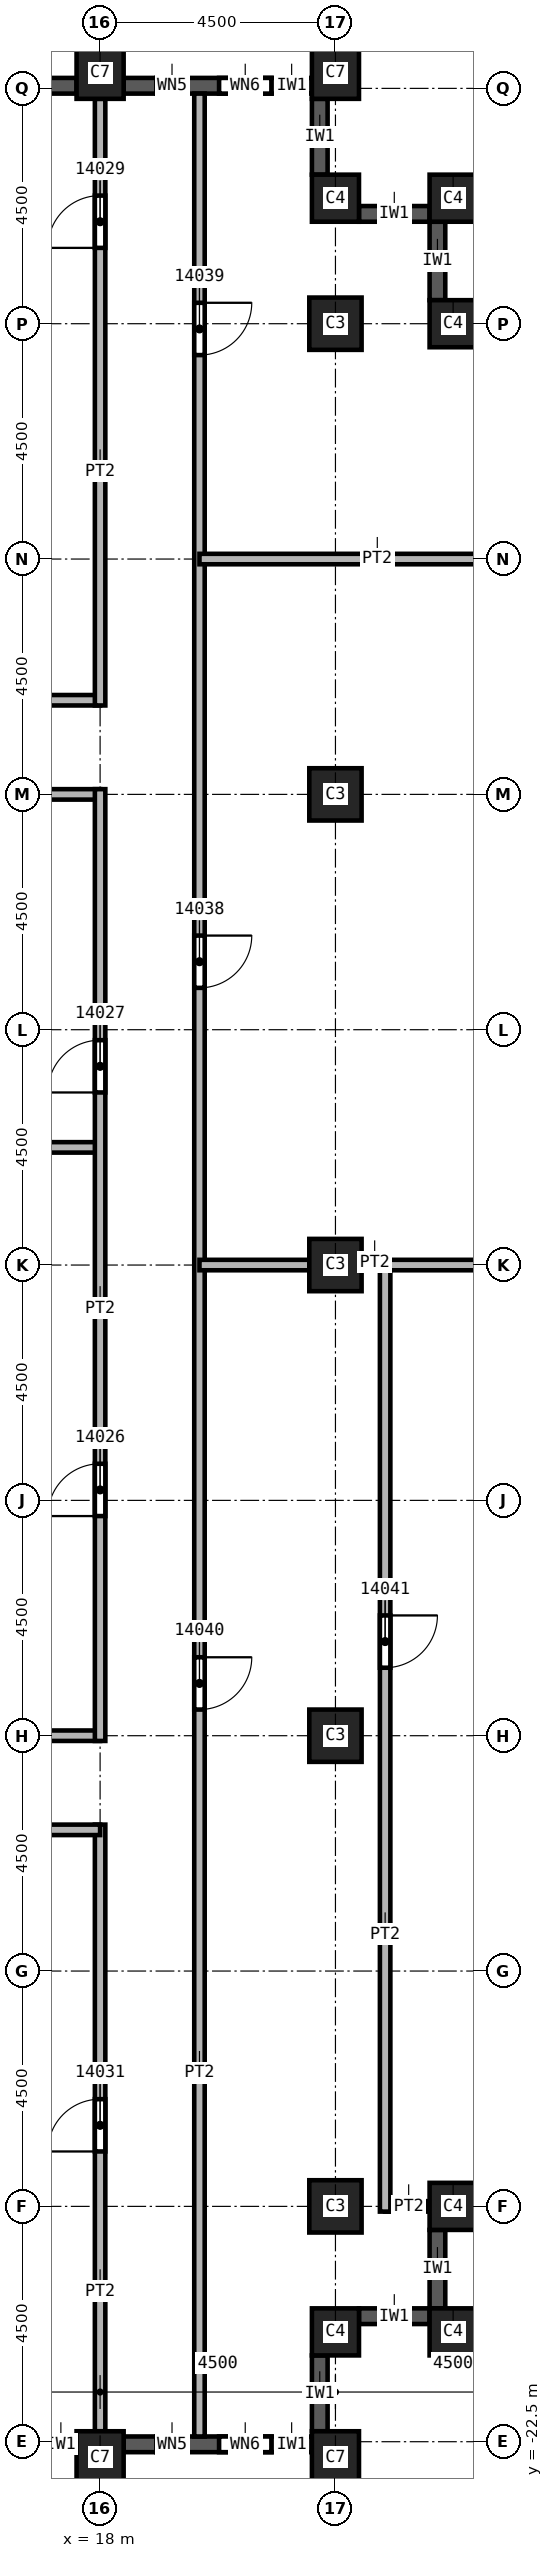
"""IFC4 building model, lengths in metres.
Left out: names, types, materials, properties, quantities, classifications, styles, units other than length and angle.
Written with IfcOpenShell. Run it as: python <this file> out.ifc"""

import sys

from ifc_helpers import new_model, si_unit, direction, frame, frame_2d, origin, origin_2d, place, context, subcontext, project, spatial, rectangle, extrude, element, fill, save


model = new_model("IFC4")
c1 = context("Model", 3, precision=1e-05, world=origin(), true_north=direction((0.0, 1.0)))
c2 = subcontext(c1, "Body", "Model", "MODEL_VIEW")
j1 = project(units=[si_unit("LENGTHUNIT", "METRE"), si_unit("PLANEANGLEUNIT", "RADIAN")], contexts=[c1])
p1 = place(None, origin())
s1 = spatial("IfcSite", under=j1, at=p1, CompositionType="ELEMENT")
p2 = place(p1, origin())
s2 = spatial("IfcBuilding", under=s1, at=p2, CompositionType="ELEMENT")
p3 = place(p2, frame((0.0, 0.0, 224.0)))
s3 = spatial("IfcBuildingStorey", under=s2, at=p3, CompositionType="ELEMENT", Elevation=224.0)
for number, where, z_axis, x_axis in (
    (1, (22.5, 0.0, 0.0), (0.0, 0.0, 1.0), (1.0, 0.0, 0.0)),
    (2, (22.5, 9.0, 0.0), (0.0, 0.0, 1.0), (1.0, 0.0, 0.0)),
    (3, (22.5, 18.0, 0.0), (0.0, 0.0, 1.0), (1.0, 0.0, 0.0)),
    (4, (22.5, -9.0, 0.0), (0.0, 0.0, 1.0), (1.0, 0.0, 0.0)),
    (5, (22.5, -18.0, 0.0), (0.0, 0.0, 1.0), (1.0, 0.0, 0.0)),
):
    element("IfcColumn", number, at=place(p3, frame(where, z_axis=z_axis, x_axis=x_axis)), inside=s3, PredefinedType="COLUMN", context=c2, shape_type="SweptSolid", body=[
        extrude(rectangle(XDim=1.0, YDim=1.0, at=origin_2d()), origin(), (0.0, 0.0, 1.0), 3.72),
    ])
for number, where, z_axis, x_axis in (
    (6, (18.0, 22.8, 0.0), (0.0, 0.0, 1.0), (1.0, 0.0, 0.0)),
    (7, (22.5, 22.8, 0.0), (0.0, 0.0, 1.0), (1.0, 0.0, 0.0)),
    (8, (18.0, -22.8, 0.0), (0.0, 0.0, 1.0), (1.0, 0.0, 0.0)),
    (9, (22.5, -22.8, 0.0), (0.0, 0.0, 1.0), (1.0, 0.0, 0.0)),
):
    element("IfcColumn", number, at=place(p3, frame(where, z_axis=z_axis, x_axis=x_axis)), inside=s3, PredefinedType="COLUMN", context=c2, shape_type="SweptSolid", body=[
        extrude(rectangle(XDim=0.9, YDim=1.0, at=origin_2d()), origin(), (0.0, 0.0, 1.0), 3.72),
    ])
for number, where, z_axis, x_axis in (
    (10, (22.5, 20.4, 0.0), (0.0, 0.0, 1.0), (1.0, 0.0, 0.0)),
    (11, (24.75, 20.4, 0.0), (0.0, 0.0, 1.0), (1.0, 0.0, 0.0)),
    (12, (24.75, 18.0, 0.0), (0.0, 0.0, 1.0), (1.0, 0.0, 0.0)),
    (13, (22.5, -20.4, 0.0), (0.0, 0.0, 1.0), (1.0, 0.0, 0.0)),
    (14, (24.75, -20.4, 0.0), (0.0, 0.0, 1.0), (1.0, 0.0, 0.0)),
    (15, (24.75, -18.0, 0.0), (0.0, 0.0, 1.0), (1.0, 0.0, 0.0)),
):
    element("IfcColumn", number, at=place(p3, frame(where, z_axis=z_axis, x_axis=x_axis)), inside=s3, PredefinedType="COLUMN", context=c2, shape_type="SweptSolid", body=[
        extrude(rectangle(XDim=0.9, YDim=0.9, at=origin_2d()), origin(), (0.0, 0.0, 1.0), 3.72),
    ])
p4 = place(p3, frame((13.95, -22.55, 0.0), z_axis=(0.0, 0.0, 1.0), x_axis=(1.0, 0.0, 0.0)))
e16 = element("IfcWall", 16, at=p4, inside=s3, PredefinedType="SOLIDWALL", context=c2, shape_type="SweptSolid", body=[
    extrude(rectangle(XDim=3.6, YDim=0.3, at=frame_2d((1.8, 0.0))), origin(), (0.0, 0.0, 1.0), 3.12),
])
p5 = place(p4, frame((0.6, 0.0, 0.8)))
e17 = element("IfcOpeningElement", 17, at=p5, cuts=e16, PredefinedType="OPENING", context=c2, shape_type="SweptSolid", body=[
    extrude(rectangle(XDim=2.4, YDim=1.95, at=frame_2d((1.2, 0.975))), frame((0.0, 0.15, 0.0), z_axis=(0.0, -1.0, 0.0), x_axis=(1.0, 0.0, 0.0)), (0.0, 0.0, 1.0), 0.3),
])
p6 = place(p3, frame((18.45, -22.55, 0.0), z_axis=(0.0, 0.0, 1.0), x_axis=(1.0, 0.0, 0.0)))
e18 = element("IfcWall", 18, at=p6, inside=s3, PredefinedType="SOLIDWALL", context=c2, shape_type="SweptSolid", body=[
    extrude(rectangle(XDim=3.6, YDim=0.3, at=frame_2d((1.8, 0.0))), origin(), (0.0, 0.0, 1.0), 3.12),
])
p7 = place(p6, frame((0.625, 0.0, 0.8)))
e19 = element("IfcOpeningElement", 19, at=p7, cuts=e18, PredefinedType="OPENING", context=c2, shape_type="SweptSolid", body=[
    extrude(rectangle(XDim=0.6, YDim=1.95, at=frame_2d((0.3, 0.975))), frame((0.0, 0.15, 0.0), z_axis=(0.0, -1.0, 0.0), x_axis=(1.0, 0.0, 0.0)), (0.0, 0.0, 1.0), 0.3),
])
p8 = place(p6, frame((1.825, 0.0, 0.8)))
e20 = element("IfcOpeningElement", 20, at=p8, cuts=e18, PredefinedType="OPENING", context=c2, shape_type="SweptSolid", body=[
    extrude(rectangle(XDim=1.0, YDim=1.95, at=frame_2d((0.5, 0.975))), frame((0.0, 0.15, 0.0), z_axis=(0.0, -1.0, 0.0), x_axis=(1.0, 0.0, 0.0)), (0.0, 0.0, 1.0), 0.3),
])
p9 = place(p3, frame((22.2, -22.3, 0.0), z_axis=(0.0, 0.0, 1.0), x_axis=(0.0, 1.0, 0.0)))
e21 = element("IfcWall", 21, at=p9, inside=s3, PredefinedType="SOLIDWALL", context=c2, shape_type="SweptSolid", body=[
    extrude(rectangle(XDim=1.45, YDim=0.3, at=frame_2d((0.725, 0.0))), origin(), (0.0, 0.0, 1.0), 3.12),
])
p10 = place(p3, frame((22.95, -20.1, 0.0), z_axis=(0.0, 0.0, 1.0), x_axis=(1.0, 0.0, 0.0)))
e22 = element("IfcWall", 22, at=p10, inside=s3, PredefinedType="SOLIDWALL", context=c2, shape_type="SweptSolid", body=[
    extrude(rectangle(XDim=1.35, YDim=0.3, at=frame_2d((0.675, 0.0))), origin(), (0.0, 0.0, 1.0), 3.12),
])
for number, where, z_axis, x_axis in (
    (23, (24.45, -19.95, 0.0), (0.0, 0.0, 1.0), (0.0, 1.0, 0.0)),
    (24, (24.45, 18.45, 0.0), (0.0, 0.0, 1.0), (0.0, 1.0, 0.0)),
):
    element("IfcWall", number, at=place(p3, frame(where, z_axis=z_axis, x_axis=x_axis)), inside=s3, PredefinedType="SOLIDWALL", context=c2, shape_type="SweptSolid", body=[
        extrude(rectangle(XDim=1.5, YDim=0.3, at=frame_2d((0.75, 0.0))), origin(), (0.0, 0.0, 1.0), 3.12),
    ])
p11 = place(p3, frame((24.3, 20.1, 0.0), z_axis=(0.0, 0.0, 1.0), x_axis=(-1.0, 0.0, 0.0)))
e25 = element("IfcWall", 25, at=p11, inside=s3, PredefinedType="SOLIDWALL", context=c2, shape_type="SweptSolid", body=[
    extrude(rectangle(XDim=1.35, YDim=0.3, at=frame_2d((0.675, 0.0))), origin(), (0.0, 0.0, 1.0), 3.12),
])
p12 = place(p3, frame((22.2, 20.85, 0.0), z_axis=(0.0, 0.0, 1.0), x_axis=(0.0, 1.0, 0.0)))
e26 = element("IfcWall", 26, at=p12, inside=s3, PredefinedType="SOLIDWALL", context=c2, shape_type="SweptSolid", body=[
    extrude(rectangle(XDim=1.45, YDim=0.3, at=frame_2d((0.725, 0.0))), origin(), (0.0, 0.0, 1.0), 3.12),
])
p13 = place(p3, frame((22.05, 22.55, 0.0), z_axis=(0.0, 0.0, 1.0), x_axis=(-1.0, 0.0, 0.0)))
e27 = element("IfcWall", 27, at=p13, inside=s3, PredefinedType="SOLIDWALL", context=c2, shape_type="SweptSolid", body=[
    extrude(rectangle(XDim=3.6, YDim=0.3, at=frame_2d((1.8, 0.0))), origin(), (0.0, 0.0, 1.0), 3.12),
])
p14 = place(p13, frame((0.775, 0.0, 0.8)))
e28 = element("IfcOpeningElement", 28, at=p14, cuts=e27, PredefinedType="OPENING", context=c2, shape_type="SweptSolid", body=[
    extrude(rectangle(XDim=1.0, YDim=1.95, at=frame_2d((0.5, 0.975))), frame((0.0, 0.15, 0.0), z_axis=(0.0, -1.0, 0.0), x_axis=(1.0, 0.0, 0.0)), (0.0, 0.0, 1.0), 0.3),
])
p15 = place(p13, frame((2.375, 0.0, 0.8)))
e29 = element("IfcOpeningElement", 29, at=p15, cuts=e27, PredefinedType="OPENING", context=c2, shape_type="SweptSolid", body=[
    extrude(rectangle(XDim=0.6, YDim=1.95, at=frame_2d((0.3, 0.975))), frame((0.0, 0.15, 0.0), z_axis=(0.0, -1.0, 0.0), x_axis=(1.0, 0.0, 0.0)), (0.0, 0.0, 1.0), 0.3),
])
p16 = place(p3, frame((17.55, 22.55, 0.0), z_axis=(0.0, 0.0, 1.0), x_axis=(-1.0, 0.0, 0.0)))
e30 = element("IfcWall", 30, at=p16, inside=s3, PredefinedType="SOLIDWALL", context=c2, shape_type="SweptSolid", body=[
    extrude(rectangle(XDim=3.6, YDim=0.3, at=frame_2d((1.8, 0.0))), origin(), (0.0, 0.0, 1.0), 3.12),
])
p17 = place(p16, frame((0.6, 0.0, 0.8)))
e31 = element("IfcOpeningElement", 31, at=p17, cuts=e30, PredefinedType="OPENING", context=c2, shape_type="SweptSolid", body=[
    extrude(rectangle(XDim=2.4, YDim=1.95, at=frame_2d((1.2, 0.975))), frame((0.0, 0.15, 0.0), z_axis=(0.0, -1.0, 0.0), x_axis=(1.0, 0.0, 0.0)), (0.0, 0.0, 1.0), 0.3),
])
for number, where, z_axis, x_axis in (
    (32, (13.5, -9.0, 0.0), (0.0, 0.0, 1.0), (1.0, 0.0, 0.0)),
    (33, (13.5, 2.25, 0.0), (0.0, 0.0, 1.0), (1.0, 0.0, 0.0)),
    (34, (18.0, 9.0, 0.0), (0.0, 0.0, 1.0), (-1.0, 0.0, 0.0)),
):
    element("IfcWall", number, at=place(p3, frame(where, z_axis=z_axis, x_axis=x_axis)), inside=s3, PredefinedType="PARTITIONING", context=c2, shape_type="SweptSolid", body=[
        extrude(rectangle(XDim=4.5, YDim=0.2, at=frame_2d((2.25, 0.0))), origin(), (0.0, 0.0, 1.0), 3.72),
    ])
p18 = place(p3, frame((14.4, 10.8, 0.0), z_axis=(0.0, 0.0, 1.0), x_axis=(1.0, 0.0, 0.0)))
e35 = element("IfcWall", 35, at=p18, inside=s3, PredefinedType="PARTITIONING", context=c2, shape_type="SweptSolid", body=[
    extrude(rectangle(XDim=3.6, YDim=0.2, at=frame_2d((1.8, 0.0))), origin(), (0.0, 0.0, 1.0), 3.72),
])
p19 = place(p3, frame((18.0, -22.3, 0.0), z_axis=(0.0, 0.0, 1.0), x_axis=(0.0, 1.0, 0.0)))
e36 = element("IfcWall", 36, at=p19, inside=s3, PredefinedType="PARTITIONING", context=c2, shape_type="SweptSolid", body=[
    extrude(rectangle(XDim=11.6, YDim=0.2, at=frame_2d((5.8, 0.0))), origin(), (0.0, 0.0, 1.0), 3.72),
])
p20 = place(p19, frame((5.35, 0.0, 0.0)))
e37 = element("IfcOpeningElement", 37, at=p20, cuts=e36, PredefinedType="OPENING", context=c2, shape_type="SweptSolid", body=[
    extrude(rectangle(XDim=1.0, YDim=2.1, at=frame_2d((0.5, 1.05))), frame((0.0, 0.1, 0.0), z_axis=(0.0, -1.0, 0.0), x_axis=(1.0, 0.0, 0.0)), (0.0, 0.0, 1.0), 0.2),
])
p21 = place(p3, frame((18.0, -10.8, 0.0), z_axis=(0.0, 0.0, 1.0), x_axis=(-1.0, 0.0, 0.0)))
e38 = element("IfcWall", 38, at=p21, inside=s3, PredefinedType="PARTITIONING", context=c2, shape_type="SweptSolid", body=[
    extrude(rectangle(XDim=3.6, YDim=0.2, at=frame_2d((1.8, 0.0))), origin(), (0.0, 0.0, 1.0), 3.72),
])
p22 = place(p3, frame((18.0, -9.1, 0.0), z_axis=(0.0, 0.0, 1.0), x_axis=(0.0, 1.0, 0.0)))
e39 = element("IfcWall", 39, at=p22, inside=s3, PredefinedType="PARTITIONING", context=c2, shape_type="SweptSolid", body=[
    extrude(rectangle(XDim=18.2, YDim=0.2, at=frame_2d((9.1, 0.0))), origin(), (0.0, 0.0, 1.0), 3.72),
])
p23 = place(p22, frame((4.3, 0.0, 0.0)))
e40 = element("IfcOpeningElement", 40, at=p23, cuts=e39, PredefinedType="OPENING", context=c2, shape_type="SweptSolid", body=[
    extrude(rectangle(XDim=1.0, YDim=2.1, at=frame_2d((0.5, 1.05))), frame((0.0, 0.1, 0.0), z_axis=(0.0, -1.0, 0.0), x_axis=(1.0, 0.0, 0.0)), (0.0, 0.0, 1.0), 0.2),
])
p24 = place(p22, frame((12.4, 0.0, 0.0)))
e41 = element("IfcOpeningElement", 41, at=p24, cuts=e39, PredefinedType="OPENING", context=c2, shape_type="SweptSolid", body=[
    extrude(rectangle(XDim=1.0, YDim=2.1, at=frame_2d((0.5, 1.05))), frame((0.0, 0.1, 0.0), z_axis=(0.0, -1.0, 0.0), x_axis=(1.0, 0.0, 0.0)), (0.0, 0.0, 1.0), 0.2),
])
p25 = place(p3, frame((18.0, 10.7, 0.0), z_axis=(0.0, 0.0, 1.0), x_axis=(0.0, 1.0, 0.0)))
e42 = element("IfcWall", 42, at=p25, inside=s3, PredefinedType="PARTITIONING", context=c2, shape_type="SweptSolid", body=[
    extrude(rectangle(XDim=11.6, YDim=0.2, at=frame_2d((5.8, 0.0))), origin(), (0.0, 0.0, 1.0), 3.72),
])
p26 = place(p25, frame((8.75, 0.0, 0.0)))
e43 = element("IfcOpeningElement", 43, at=p26, cuts=e42, PredefinedType="OPENING", context=c2, shape_type="SweptSolid", body=[
    extrude(rectangle(XDim=1.0, YDim=2.1, at=frame_2d((0.5, 1.05))), frame((0.0, 0.1, 0.0), z_axis=(0.0, -1.0, 0.0), x_axis=(1.0, 0.0, 0.0)), (0.0, 0.0, 1.0), 0.2),
])
p27 = place(p3, frame((19.9, 22.4, 0.0), z_axis=(0.0, 0.0, 1.0), x_axis=(0.0, -1.0, 0.0)))
e44 = element("IfcWall", 44, at=p27, inside=s3, PredefinedType="PARTITIONING", context=c2, shape_type="SweptSolid", body=[
    extrude(rectangle(XDim=44.8, YDim=0.2, at=frame_2d((22.4, 0.0))), origin(), (0.0, 0.0, 1.0), 3.72),
])
p28 = place(p27, frame((16.1, 0.0, 0.0)))
e45 = element("IfcOpeningElement", 45, at=p28, cuts=e44, PredefinedType="OPENING", context=c2, shape_type="SweptSolid", body=[
    extrude(rectangle(XDim=1.0, YDim=2.1, at=frame_2d((0.5, 1.05))), frame((0.0, 0.1, 0.0), z_axis=(0.0, -1.0, 0.0), x_axis=(1.0, 0.0, 0.0)), (0.0, 0.0, 1.0), 0.2),
])
p29 = place(p27, frame((4.0, 0.0, 0.0)))
e46 = element("IfcOpeningElement", 46, at=p29, cuts=e44, PredefinedType="OPENING", context=c2, shape_type="SweptSolid", body=[
    extrude(rectangle(XDim=1.0, YDim=2.1, at=frame_2d((0.5, 1.05))), frame((0.0, 0.1, 0.0), z_axis=(0.0, -1.0, 0.0), x_axis=(1.0, 0.0, 0.0)), (0.0, 0.0, 1.0), 0.2),
])
p30 = place(p27, frame((29.9, 0.0, 0.0)))
e47 = element("IfcOpeningElement", 47, at=p30, cuts=e44, PredefinedType="OPENING", context=c2, shape_type="SweptSolid", body=[
    extrude(rectangle(XDim=1.0, YDim=2.1, at=frame_2d((0.5, 1.05))), frame((0.0, 0.1, 0.0), z_axis=(0.0, -1.0, 0.0), x_axis=(1.0, 0.0, 0.0)), (0.0, 0.0, 1.0), 0.2),
])
p31 = place(p3, frame((19.9, 13.5, 0.0), z_axis=(0.0, 0.0, 1.0), x_axis=(1.0, 0.0, 0.0)))
e48 = element("IfcWall", 48, at=p31, inside=s3, PredefinedType="PARTITIONING", context=c2, shape_type="SweptSolid", body=[
    extrude(rectangle(XDim=6.7, YDim=0.2, at=frame_2d((3.35, 0.0))), origin(), (0.0, 0.0, 1.0), 3.72),
])
p32 = place(p3, frame((23.45, -18.0, 0.0), z_axis=(0.0, 0.0, 1.0), x_axis=(1.0, 0.0, 0.0)))
e49 = element("IfcWall", 49, at=p32, inside=s3, PredefinedType="PARTITIONING", context=c2, shape_type="SweptSolid", body=[
    extrude(rectangle(XDim=0.8, YDim=0.2, at=frame_2d((0.4, 0.0))), origin(), (0.0, 0.0, 1.0), 3.72),
])
p33 = place(p3, frame((23.45, 0.0, 0.0), z_axis=(0.0, 0.0, 1.0), x_axis=(0.0, -1.0, 0.0)))
e50 = element("IfcWall", 50, at=p33, inside=s3, PredefinedType="PARTITIONING", context=c2, shape_type="SweptSolid", body=[
    extrude(rectangle(XDim=18.1, YDim=0.2, at=frame_2d((9.05, 0.0))), origin(), (0.0, 0.0, 1.0), 3.72),
])
p34 = place(p33, frame((6.7, 0.0, 0.0)))
e51 = element("IfcOpeningElement", 51, at=p34, cuts=e50, PredefinedType="OPENING", context=c2, shape_type="SweptSolid", body=[
    extrude(rectangle(XDim=1.0, YDim=2.1, at=frame_2d((0.5, 1.05))), frame((0.0, 0.1, 0.0), z_axis=(0.0, -1.0, 0.0), x_axis=(1.0, 0.0, 0.0)), (0.0, 0.0, 1.0), 0.2),
])
p35 = place(p3, frame((26.5, 0.0, 0.0), z_axis=(0.0, 0.0, 1.0), x_axis=(-1.0, 0.0, 0.0)))
e52 = element("IfcWall", 52, at=p35, inside=s3, PredefinedType="PARTITIONING", context=c2, shape_type="SweptSolid", body=[
    extrude(rectangle(XDim=6.6, YDim=0.2, at=frame_2d((3.3, 0.0))), origin(), (0.0, 0.0, 1.0), 3.72),
])
p36 = place(p23, origin())
e53 = element("IfcDoor", 53, at=p36, inside=s3, OperationType="SINGLE_SWING_LEFT", PredefinedType="DOOR", context=c2, shape_type="SweptSolid", body=[
    extrude(rectangle(XDim=1.0, YDim=2.1, at=frame_2d((0.5, 1.05))), frame((0.0, 0.025, 0.0), z_axis=(0.0, -1.0, 0.0), x_axis=(1.0, 0.0, 0.0)), (0.0, 0.0, 1.0), 0.05),
])
fill(e40, e53)
p37 = place(p24, origin())
e54 = element("IfcDoor", 54, at=p37, inside=s3, OperationType="SINGLE_SWING_RIGHT", PredefinedType="DOOR", context=c2, shape_type="SweptSolid", body=[
    extrude(rectangle(XDim=1.0, YDim=2.1, at=frame_2d((0.5, 1.05))), frame((0.0, 0.025, 0.0), z_axis=(0.0, -1.0, 0.0), x_axis=(1.0, 0.0, 0.0)), (0.0, 0.0, 1.0), 0.05),
])
fill(e41, e54)
p38 = place(p26, origin())
e55 = element("IfcDoor", 55, at=p38, inside=s3, OperationType="SINGLE_SWING_RIGHT", PredefinedType="DOOR", context=c2, shape_type="SweptSolid", body=[
    extrude(rectangle(XDim=1.0, YDim=2.1, at=frame_2d((0.5, 1.05))), frame((0.0, 0.025, 0.0), z_axis=(0.0, -1.0, 0.0), x_axis=(1.0, 0.0, 0.0)), (0.0, 0.0, 1.0), 0.05),
])
fill(e43, e55)
p39 = place(p20, origin())
e56 = element("IfcDoor", 56, at=p39, inside=s3, OperationType="SINGLE_SWING_RIGHT", PredefinedType="DOOR", context=c2, shape_type="SweptSolid", body=[
    extrude(rectangle(XDim=1.0, YDim=2.1, at=frame_2d((0.5, 1.05))), frame((0.0, 0.025, 0.0), z_axis=(0.0, -1.0, 0.0), x_axis=(1.0, 0.0, 0.0)), (0.0, 0.0, 1.0), 0.05),
])
fill(e37, e56)
p40 = place(p28, origin())
e57 = element("IfcDoor", 57, at=p40, inside=s3, OperationType="SINGLE_SWING_LEFT", PredefinedType="DOOR", context=c2, shape_type="SweptSolid", body=[
    extrude(rectangle(XDim=1.0, YDim=2.1, at=frame_2d((0.5, 1.05))), frame((0.0, 0.025, 0.0), z_axis=(0.0, -1.0, 0.0), x_axis=(1.0, 0.0, 0.0)), (0.0, 0.0, 1.0), 0.05),
])
fill(e45, e57)
p41 = place(p29, origin())
e58 = element("IfcDoor", 58, at=p41, inside=s3, OperationType="SINGLE_SWING_RIGHT", PredefinedType="DOOR", context=c2, shape_type="SweptSolid", body=[
    extrude(rectangle(XDim=1.0, YDim=2.1, at=frame_2d((0.5, 1.05))), frame((0.0, 0.025, 0.0), z_axis=(0.0, -1.0, 0.0), x_axis=(1.0, 0.0, 0.0)), (0.0, 0.0, 1.0), 0.05),
])
fill(e46, e58)
p42 = place(p30, origin())
e59 = element("IfcDoor", 59, at=p42, inside=s3, OperationType="SINGLE_SWING_LEFT", PredefinedType="DOOR", context=c2, shape_type="SweptSolid", body=[
    extrude(rectangle(XDim=1.0, YDim=2.1, at=frame_2d((0.5, 1.05))), frame((0.0, 0.025, 0.0), z_axis=(0.0, -1.0, 0.0), x_axis=(1.0, 0.0, 0.0)), (0.0, 0.0, 1.0), 0.05),
])
fill(e47, e59)
p43 = place(p34, origin())
e60 = element("IfcDoor", 60, at=p43, inside=s3, OperationType="SINGLE_SWING_RIGHT", PredefinedType="DOOR", context=c2, shape_type="SweptSolid", body=[
    extrude(rectangle(XDim=1.0, YDim=2.1, at=frame_2d((0.5, 1.05))), frame((0.0, 0.025, 0.0), z_axis=(0.0, -1.0, 0.0), x_axis=(1.0, 0.0, 0.0)), (0.0, 0.0, 1.0), 0.05),
])
fill(e51, e60)
p44 = place(p7, origin())
e61 = element("IfcWindow", 61, at=p44, inside=s3, PartitioningType="SINGLE_PANEL", PredefinedType="WINDOW", context=c2, shape_type="SweptSolid", body=[
    extrude(rectangle(XDim=0.6, YDim=1.95, at=frame_2d((0.3, 0.975))), frame((0.0, 0.03, 0.0), z_axis=(0.0, -1.0, 0.0), x_axis=(1.0, 0.0, 0.0)), (0.0, 0.0, 1.0), 0.06),
])
fill(e19, e61)
p45 = place(p8, origin())
e62 = element("IfcWindow", 62, at=p45, inside=s3, PartitioningType="SINGLE_PANEL", PredefinedType="WINDOW", context=c2, shape_type="SweptSolid", body=[
    extrude(rectangle(XDim=1.0, YDim=1.95, at=frame_2d((0.5, 0.975))), frame((0.0, 0.03, 0.0), z_axis=(0.0, -1.0, 0.0), x_axis=(1.0, 0.0, 0.0)), (0.0, 0.0, 1.0), 0.06),
])
fill(e20, e62)
p46 = place(p14, origin())
e63 = element("IfcWindow", 63, at=p46, inside=s3, PartitioningType="SINGLE_PANEL", PredefinedType="WINDOW", context=c2, shape_type="SweptSolid", body=[
    extrude(rectangle(XDim=1.0, YDim=1.95, at=frame_2d((0.5, 0.975))), frame((0.0, 0.03, 0.0), z_axis=(0.0, -1.0, 0.0), x_axis=(1.0, 0.0, 0.0)), (0.0, 0.0, 1.0), 0.06),
])
fill(e28, e63)
p47 = place(p15, origin())
e64 = element("IfcWindow", 64, at=p47, inside=s3, PartitioningType="SINGLE_PANEL", PredefinedType="WINDOW", context=c2, shape_type="SweptSolid", body=[
    extrude(rectangle(XDim=0.6, YDim=1.95, at=frame_2d((0.3, 0.975))), frame((0.0, 0.03, 0.0), z_axis=(0.0, -1.0, 0.0), x_axis=(1.0, 0.0, 0.0)), (0.0, 0.0, 1.0), 0.06),
])
fill(e29, e64)
save(model, sys.argv[1])
